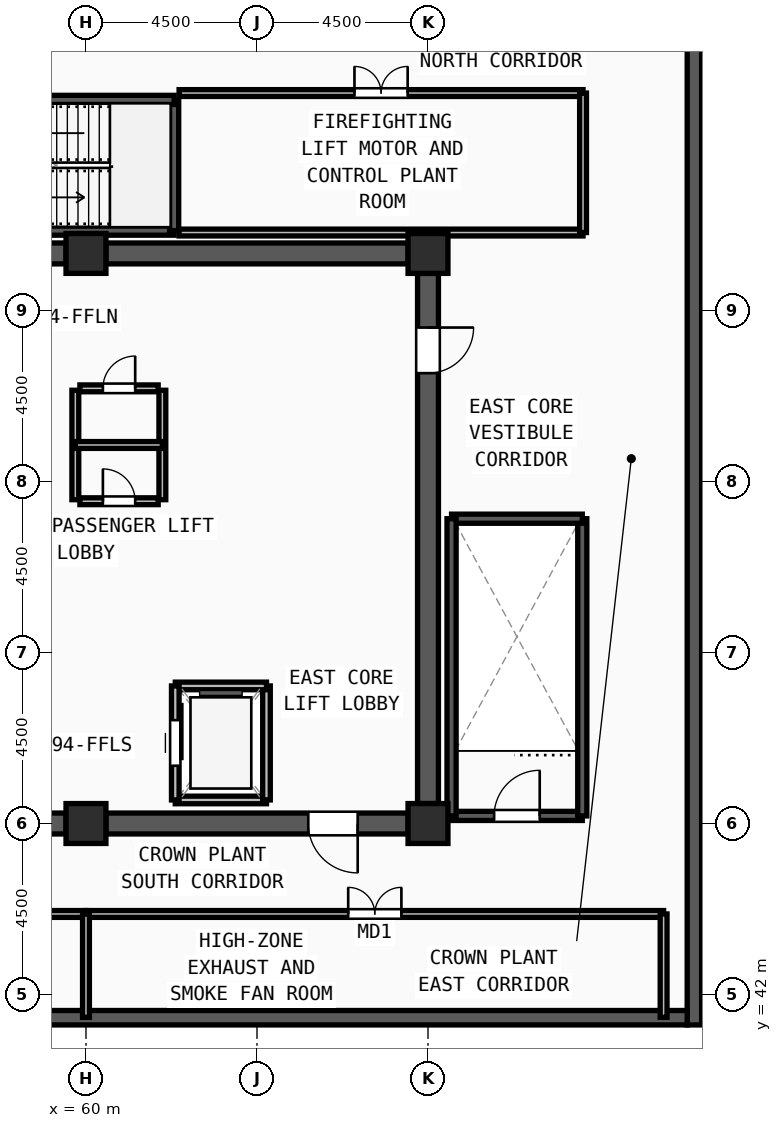
"""IFC4 building model, lengths in metres.
Left out: names, types, materials, properties, quantities, classifications, styles, units other than length and angle.
Written with IfcOpenShell. Run it as: python <this file> out.ifc"""

import sys

from ifc_helpers import new_model, si_unit, direction, frame, frame_2d, origin, origin_2d, place, context, subcontext, project, spatial, rectangle, extrude, source, transform, mapped, element, fill, save


model = new_model("IFC4")
c1 = context("Model", 3, precision=1e-05, world=origin(), true_north=direction((0.0, 1.0)))
c2 = subcontext(c1, "Body", "Model", "MODEL_VIEW")
j1 = project(units=[si_unit("LENGTHUNIT", "METRE"), si_unit("PLANEANGLEUNIT", "RADIAN")], contexts=[c1])
p1 = place(None, origin())
s1 = spatial("IfcSite", under=j1, at=p1, CompositionType="ELEMENT")
p2 = place(p1, origin())
s2 = spatial("IfcBuilding", under=s1, at=p2, CompositionType="ELEMENT")
p3 = place(p2, frame((0.0, 0.0, 366.0)))
s3 = spatial("IfcBuildingStorey", under=s2, at=p3, CompositionType="ELEMENT", Elevation=366.0)
m1 = source(origin(), c2, "Body", "SweptSolid", [
    extrude(rectangle(XDim=1.05, YDim=1.05, at=origin_2d()), origin(), (0.0, 0.0, 1.0), 5.4),
])
for number, where, z_axis, x_axis in (
    (1, (60.0, 46.5, 0.0), (0.0, 0.0, 1.0), (1.0, 0.0, 0.0)),
    (2, (69.0, 46.5, 0.0), (0.0, 0.0, 1.0), (1.0, 0.0, 0.0)),
    (3, (69.0, 61.5, 0.0), (0.0, 0.0, 1.0), (1.0, 0.0, 0.0)),
    (4, (60.0, 61.5, 0.0), (0.0, 0.0, 1.0), (1.0, 0.0, 0.0)),
):
    element("IfcColumn", number, at=place(p3, frame(where, z_axis=z_axis, x_axis=x_axis)), inside=s3, PredefinedType="COLUMN", context=c2, shape_type="MappedRepresentation", body=[
        mapped(m1, transform((0.0, 0.0, 0.0), x_axis=(1.0, 0.0, 0.0), y_axis=(0.0, 1.0, 0.0), z_axis=(0.0, 0.0, 1.0), scale=1.0)),
    ])
p4 = place(p3, frame((76.01, 68.5, 0.0), z_axis=(0.0, 0.0, 1.0), x_axis=(0.0, -1.0, 0.0)))
e5 = element("IfcWall", 5, at=p4, inside=s3, PredefinedType="SOLIDWALL", context=c2, shape_type="SweptSolid", body=[
    extrude(rectangle(XDim=27.3, YDim=0.38, at=frame_2d((13.65, 0.0))), origin(), (0.0, 0.0, 1.0), 4.95),
])
p5 = place(p3, frame((75.82, 41.39, 0.0), z_axis=(0.0, 0.0, 1.0), x_axis=(-1.0, 0.0, 0.0)))
e6 = element("IfcWall", 6, at=p5, inside=s3, PredefinedType="SOLIDWALL", context=c2, shape_type="SweptSolid", body=[
    extrude(rectangle(XDim=31.64, YDim=0.38, at=frame_2d((15.82, 0.0))), origin(), (0.0, 0.0, 1.0), 4.95),
])
for number, where, z_axis, x_axis in (
    (7, (51.525, 61.5, 0.0), (0.0, 0.0, 1.0), (1.0, 0.0, 0.0)),
    (8, (60.525, 61.5, 0.0), (0.0, 0.0, 1.0), (1.0, 0.0, 0.0)),
):
    element("IfcWall", number, at=place(p3, frame(where, z_axis=z_axis, x_axis=x_axis)), inside=s3, PredefinedType="SHEAR", context=c2, shape_type="SweptSolid", body=[
        extrude(rectangle(XDim=7.95, YDim=0.55, at=frame_2d((3.975, 0.0))), origin(), (0.0, 0.0, 1.0), 4.95),
    ])
p6 = place(p3, frame((69.0, 60.975, 0.0), z_axis=(0.0, 0.0, 1.0), x_axis=(0.0, -1.0, 0.0)))
e9 = element("IfcWall", 9, at=p6, inside=s3, PredefinedType="SHEAR", context=c2, shape_type="SweptSolid", body=[
    extrude(rectangle(XDim=13.95, YDim=0.55, at=frame_2d((6.975, 0.0))), origin(), (0.0, 0.0, 1.0), 4.95),
])
m2 = source(origin(), c2, "Body", "SweptSolid", [
    extrude(rectangle(XDim=1.2, YDim=2.2, at=frame_2d((0.6, 1.1))), frame((0.0, 0.285, 0.0), z_axis=(0.0, -1.0, 0.0), x_axis=(1.0, 0.0, 0.0)), (0.0, 0.0, 1.0), 0.57),
])
p7 = place(p6, frame((1.425, 0.0, 0.0)))
e10 = element("IfcOpeningElement", 10, at=p7, cuts=e9, PredefinedType="OPENING", context=c2, shape_type="MappedRepresentation", body=[
    mapped(m2, transform((0.0, 0.0, 0.0), x_axis=(1.0, 0.0, 0.0), y_axis=(0.0, 1.0, 0.0), z_axis=(0.0, 0.0, 1.0), scale=1.0)),
])
p8 = place(p3, frame((68.475, 46.5, 0.0), z_axis=(0.0, 0.0, 1.0), x_axis=(-1.0, 0.0, 0.0)))
e11 = element("IfcWall", 11, at=p8, inside=s3, PredefinedType="SHEAR", context=c2, shape_type="SweptSolid", body=[
    extrude(rectangle(XDim=7.95, YDim=0.55, at=frame_2d((3.975, 0.0))), origin(), (0.0, 0.0, 1.0), 4.95),
])
m3 = source(origin(), c2, "Body", "SweptSolid", [
    extrude(rectangle(XDim=1.3, YDim=2.2, at=frame_2d((0.65, 1.1))), frame((0.0, 0.285, 0.0), z_axis=(0.0, -1.0, 0.0), x_axis=(1.0, 0.0, 0.0)), (0.0, 0.0, 1.0), 0.57),
])
p9 = place(p8, frame((1.325, 0.0, 0.0)))
e12 = element("IfcOpeningElement", 12, at=p9, cuts=e11, PredefinedType="OPENING", context=c2, shape_type="MappedRepresentation", body=[
    mapped(m3, transform((0.0, 0.0, 0.0), x_axis=(1.0, 0.0, 0.0), y_axis=(0.0, 1.0, 0.0), z_axis=(0.0, 0.0, 1.0), scale=1.0)),
])
p10 = place(p3, frame((59.475, 46.5, 0.0), z_axis=(0.0, 0.0, 1.0), x_axis=(-1.0, 0.0, 0.0)))
e13 = element("IfcWall", 13, at=p10, inside=s3, PredefinedType="SHEAR", context=c2, shape_type="SweptSolid", body=[
    extrude(rectangle(XDim=7.95, YDim=0.55, at=frame_2d((3.975, 0.0))), origin(), (0.0, 0.0, 1.0), 4.95),
])
p11 = place(p10, frame((5.325, 0.0, 0.0)))
e14 = element("IfcOpeningElement", 14, at=p11, cuts=e13, PredefinedType="OPENING", context=c2, shape_type="MappedRepresentation", body=[
    mapped(m3, transform((0.0, 0.0, 0.0), x_axis=(1.0, 0.0, 0.0), y_axis=(0.0, 1.0, 0.0), z_axis=(0.0, 0.0, 1.0), scale=1.0)),
])
m4 = source(origin(), c2, "Body", "SweptSolid", [
    extrude(rectangle(XDim=1.0, YDim=2.2, at=frame_2d((0.5, 1.1))), frame((0.0, 0.285, 0.0), z_axis=(0.0, -1.0, 0.0), x_axis=(1.0, 0.0, 0.0)), (0.0, 0.0, 1.0), 0.57),
])
p12 = place(p10, frame((0.825, 0.0, 0.0)))
e15 = element("IfcOpeningElement", 15, at=p12, cuts=e13, PredefinedType="OPENING", context=c2, shape_type="MappedRepresentation", body=[
    mapped(m4, transform((0.0, 0.0, 0.0), x_axis=(1.0, 0.0, 0.0), y_axis=(0.0, 1.0, 0.0), z_axis=(0.0, 0.0, 1.0), scale=1.0)),
])
p13 = place(p3, frame((69.62, 46.7, 0.0), z_axis=(0.0, 0.0, 1.0), x_axis=(1.0, 0.0, 0.0)))
e16 = element("IfcWall", 16, at=p13, inside=s3, PredefinedType="SOLIDWALL", context=c2, shape_type="SweptSolid", body=[
    extrude(rectangle(XDim=3.44, YDim=0.24, at=frame_2d((1.72, 0.0))), origin(), (0.0, 0.0, 1.0), 4.95),
])
m5 = source(origin(), c2, "Body", "SweptSolid", [
    extrude(rectangle(XDim=1.2, YDim=2.2, at=frame_2d((0.6, 1.1))), frame((0.0, 0.13, 0.0), z_axis=(0.0, -1.0, 0.0), x_axis=(1.0, 0.0, 0.0)), (0.0, 0.0, 1.0), 0.26),
])
p14 = place(p13, frame((1.12, 0.0, 0.0)))
e17 = element("IfcOpeningElement", 17, at=p14, cuts=e16, PredefinedType="OPENING", context=c2, shape_type="MappedRepresentation", body=[
    mapped(m5, transform((0.0, 0.0, 0.0), x_axis=(1.0, 0.0, 0.0), y_axis=(0.0, 1.0, 0.0), z_axis=(0.0, 0.0, 1.0), scale=1.0)),
])
p15 = place(p3, frame((73.06, 46.7, 0.0), z_axis=(0.0, 0.0, 1.0), x_axis=(0.0, 1.0, 0.0)))
e18 = element("IfcWall", 18, at=p15, inside=s3, PredefinedType="SOLIDWALL", context=c2, shape_type="SweptSolid", body=[
    extrude(rectangle(XDim=7.82, YDim=0.24, at=frame_2d((3.91, 0.0))), origin(), (0.0, 0.0, 1.0), 4.95),
])
p16 = place(p3, frame((73.06, 54.52, 0.0), z_axis=(0.0, 0.0, 1.0), x_axis=(-1.0, 0.0, 0.0)))
e19 = element("IfcWall", 19, at=p16, inside=s3, PredefinedType="SOLIDWALL", context=c2, shape_type="SweptSolid", body=[
    extrude(rectangle(XDim=3.44, YDim=0.24, at=frame_2d((1.72, 0.0))), origin(), (0.0, 0.0, 1.0), 4.95),
])
for number, where, z_axis, x_axis in (
    (20, (69.62, 54.52, 0.0), (0.0, 0.0, 1.0), (0.0, -1.0, 0.0)),
    (21, (54.5, 62.1, 0.0), (0.0, 0.0, 1.0), (1.0, 0.0, 0.0)),
):
    element("IfcWall", number, at=place(p3, frame(where, z_axis=z_axis, x_axis=x_axis)), inside=s3, PredefinedType="SOLIDWALL", context=c2, shape_type="SweptSolid", body=[
        extrude(rectangle(XDim=7.82, YDim=0.24, at=frame_2d((3.91, 0.0))), origin(), (0.0, 0.0, 1.0), 4.95),
    ])
p17 = place(p3, frame((62.32, 62.1, 0.0), z_axis=(0.0, 0.0, 1.0), x_axis=(0.0, 1.0, 0.0)))
e22 = element("IfcWall", 22, at=p17, inside=s3, PredefinedType="SOLIDWALL", context=c2, shape_type="SweptSolid", body=[
    extrude(rectangle(XDim=3.44, YDim=0.24, at=frame_2d((1.72, 0.0))), origin(), (0.0, 0.0, 1.0), 4.95),
])
p18 = place(p3, frame((62.32, 65.54, 0.0), z_axis=(0.0, 0.0, 1.0), x_axis=(-1.0, 0.0, 0.0)))
e23 = element("IfcWall", 23, at=p18, inside=s3, PredefinedType="SOLIDWALL", context=c2, shape_type="SweptSolid", body=[
    extrude(rectangle(XDim=7.82, YDim=0.24, at=frame_2d((3.91, 0.0))), origin(), (0.0, 0.0, 1.0), 4.95),
])
p19 = place(p18, frame((6.3, 0.0, 0.0)))
e24 = element("IfcOpeningElement", 24, at=p19, cuts=e23, PredefinedType="OPENING", context=c2, shape_type="MappedRepresentation", body=[
    mapped(m5, transform((0.0, 0.0, 0.0), x_axis=(1.0, 0.0, 0.0), y_axis=(0.0, 1.0, 0.0), z_axis=(0.0, 0.0, 1.0), scale=1.0)),
])
p20 = place(p3, frame((62.35, 47.12, 0.0), z_axis=(0.0, 0.0, 1.0), x_axis=(1.0, 0.0, 0.0)))
e25 = element("IfcWall", 25, at=p20, inside=s3, PredefinedType="SOLIDWALL", context=c2, shape_type="SweptSolid", body=[
    extrude(rectangle(XDim=2.4, YDim=0.2, at=frame_2d((1.2, 0.0))), origin(), (0.0, 0.0, 1.0), 4.95),
])
p21 = place(p3, frame((64.75, 47.12, 0.0), z_axis=(0.0, 0.0, 1.0), x_axis=(0.0, 1.0, 0.0)))
e26 = element("IfcWall", 26, at=p21, inside=s3, PredefinedType="SOLIDWALL", context=c2, shape_type="SweptSolid", body=[
    extrude(rectangle(XDim=3.0, YDim=0.2, at=frame_2d((1.5, 0.0))), origin(), (0.0, 0.0, 1.0), 4.95),
])
p22 = place(p3, frame((64.75, 50.12, 0.0), z_axis=(0.0, 0.0, 1.0), x_axis=(-1.0, 0.0, 0.0)))
e27 = element("IfcWall", 27, at=p22, inside=s3, PredefinedType="SOLIDWALL", context=c2, shape_type="SweptSolid", body=[
    extrude(rectangle(XDim=2.4, YDim=0.2, at=frame_2d((1.2, 0.0))), origin(), (0.0, 0.0, 1.0), 4.95),
])
p23 = place(p3, frame((62.35, 50.12, 0.0), z_axis=(0.0, 0.0, 1.0), x_axis=(0.0, -1.0, 0.0)))
e28 = element("IfcWall", 28, at=p23, inside=s3, PredefinedType="SOLIDWALL", context=c2, shape_type="SweptSolid", body=[
    extrude(rectangle(XDim=3.0, YDim=0.2, at=frame_2d((1.5, 0.0))), origin(), (0.0, 0.0, 1.0), 4.95),
])
m6 = source(origin(), c2, "Body", "SweptSolid", [
    extrude(rectangle(XDim=1.2, YDim=2.3, at=frame_2d((0.6, 1.15))), frame((0.0, 0.11, 0.0), z_axis=(0.0, -1.0, 0.0), x_axis=(1.0, 0.0, 0.0)), (0.0, 0.0, 1.0), 0.22),
])
p24 = place(p23, frame((0.9, 0.0, 0.0)))
e29 = element("IfcOpeningElement", 29, at=p24, cuts=e28, PredefinedType="OPENING", context=c2, shape_type="MappedRepresentation", body=[
    mapped(m6, transform((0.0, 0.0, 0.0), x_axis=(1.0, 0.0, 0.0), y_axis=(0.0, 1.0, 0.0), z_axis=(0.0, 0.0, 1.0), scale=1.0)),
])
p25 = place(p3, frame((59.84, 54.98, 0.0), z_axis=(0.0, 0.0, 1.0), x_axis=(1.0, 0.0, 0.0)))
e30 = element("IfcWall", 30, at=p25, inside=s3, PredefinedType="PARTITIONING", context=c2, shape_type="SweptSolid", body=[
    extrude(rectangle(XDim=2.06, YDim=0.18, at=frame_2d((1.03, 0.0))), origin(), (0.0, 0.0, 1.0), 4.95),
])
m7 = source(origin(), c2, "Body", "SweptSolid", [
    extrude(rectangle(XDim=0.85, YDim=2.1, at=frame_2d((0.425, 1.05))), frame((0.0, 0.1, 0.0), z_axis=(0.0, -1.0, 0.0), x_axis=(1.0, 0.0, 0.0)), (0.0, 0.0, 1.0), 0.2),
])
p26 = place(p25, frame((0.605, 0.0, 0.0)))
e31 = element("IfcOpeningElement", 31, at=p26, cuts=e30, PredefinedType="OPENING", context=c2, shape_type="MappedRepresentation", body=[
    mapped(m7, transform((0.0, 0.0, 0.0), x_axis=(1.0, 0.0, 0.0), y_axis=(0.0, 1.0, 0.0), z_axis=(0.0, 0.0, 1.0), scale=1.0)),
])
p27 = place(p3, frame((59.84, 57.95, 0.0), z_axis=(0.0, 0.0, 1.0), x_axis=(1.0, 0.0, 0.0)))
e32 = element("IfcWall", 32, at=p27, inside=s3, PredefinedType="PARTITIONING", context=c2, shape_type="SweptSolid", body=[
    extrude(rectangle(XDim=2.06, YDim=0.18, at=frame_2d((1.03, 0.0))), origin(), (0.0, 0.0, 1.0), 4.95),
])
p28 = place(p27, frame((0.605, 0.0, 0.0)))
e33 = element("IfcOpeningElement", 33, at=p28, cuts=e32, PredefinedType="OPENING", context=c2, shape_type="MappedRepresentation", body=[
    mapped(m7, transform((0.0, 0.0, 0.0), x_axis=(1.0, 0.0, 0.0), y_axis=(0.0, 1.0, 0.0), z_axis=(0.0, 0.0, 1.0), scale=1.0)),
])
p29 = place(p3, frame((44.8, 44.12, 0.0), z_axis=(0.0, 0.0, 1.0), x_axis=(1.0, 0.0, 0.0)))
e34 = element("IfcWall", 34, at=p29, inside=s3, PredefinedType="PARTITIONING", context=c2, shape_type="SweptSolid", body=[
    extrude(rectangle(XDim=15.2, YDim=0.18, at=frame_2d((7.6, 0.0))), origin(), (0.0, 0.0, 1.0), 4.95),
])
m8 = source(origin(), c2, "Body", "SweptSolid", [
    extrude(rectangle(XDim=1.4, YDim=2.25, at=frame_2d((0.7, 1.125))), frame((0.0, 0.1, 0.0), z_axis=(0.0, -1.0, 0.0), x_axis=(1.0, 0.0, 0.0)), (0.0, 0.0, 1.0), 0.2),
])
p30 = place(p29, frame((6.9, 0.0, 0.0)))
e35 = element("IfcOpeningElement", 35, at=p30, cuts=e34, PredefinedType="OPENING", context=c2, shape_type="MappedRepresentation", body=[
    mapped(m8, transform((0.0, 0.0, 0.0), x_axis=(1.0, 0.0, 0.0), y_axis=(0.0, 1.0, 0.0), z_axis=(0.0, 0.0, 1.0), scale=1.0)),
])
p31 = place(p3, frame((60.0, 44.12, 0.0), z_axis=(0.0, 0.0, 1.0), x_axis=(1.0, 0.0, 0.0)))
e36 = element("IfcWall", 36, at=p31, inside=s3, PredefinedType="PARTITIONING", context=c2, shape_type="SweptSolid", body=[
    extrude(rectangle(XDim=15.2, YDim=0.18, at=frame_2d((7.6, 0.0))), origin(), (0.0, 0.0, 1.0), 4.95),
])
p32 = place(p31, frame((6.9, 0.0, 0.0)))
e37 = element("IfcOpeningElement", 37, at=p32, cuts=e36, PredefinedType="OPENING", context=c2, shape_type="MappedRepresentation", body=[
    mapped(m8, transform((0.0, 0.0, 0.0), x_axis=(1.0, 0.0, 0.0), y_axis=(0.0, 1.0, 0.0), z_axis=(0.0, 0.0, 1.0), scale=1.0)),
])
p33 = place(p3, frame((62.45, 65.72, 0.0), z_axis=(0.0, 0.0, 1.0), x_axis=(1.0, 0.0, 0.0)))
e38 = element("IfcWall", 38, at=p33, inside=s3, PredefinedType="PARTITIONING", context=c2, shape_type="SweptSolid", body=[
    extrude(rectangle(XDim=10.63, YDim=0.18, at=frame_2d((5.315, 0.0))), origin(), (0.0, 0.0, 1.0), 4.95),
])
p34 = place(p33, frame((4.615, 0.0, 0.0)))
e39 = element("IfcOpeningElement", 39, at=p34, cuts=e38, PredefinedType="OPENING", context=c2, shape_type="MappedRepresentation", body=[
    mapped(m8, transform((0.0, 0.0, 0.0), x_axis=(1.0, 0.0, 0.0), y_axis=(0.0, 1.0, 0.0), z_axis=(0.0, 0.0, 1.0), scale=1.0)),
])
for number, where, z_axis, x_axis in (
    (40, (59.72, 55.02, 0.0), (0.0, 0.0, 1.0), (0.0, 1.0, 0.0)),
    (41, (62.01, 55.02, 0.0), (0.0, 0.0, 1.0), (0.0, 1.0, 0.0)),
):
    element("IfcWall", number, at=place(p3, frame(where, z_axis=z_axis, x_axis=x_axis)), inside=s3, PredefinedType="PARTITIONING", context=c2, shape_type="SweptSolid", body=[
        extrude(rectangle(XDim=2.88, YDim=0.18, at=frame_2d((1.44, 0.0))), origin(), (0.0, 0.0, 1.0), 4.95),
    ])
p35 = place(p3, frame((59.72, 56.46, 0.0), z_axis=(0.0, 0.0, 1.0), x_axis=(1.0, 0.0, 0.0)))
e42 = element("IfcWall", 42, at=p35, inside=s3, PredefinedType="PARTITIONING", context=c2, shape_type="SweptSolid", body=[
    extrude(rectangle(XDim=2.29, YDim=0.18, at=frame_2d((1.145, 0.0))), origin(), (0.0, 0.0, 1.0), 4.95),
])
p36 = place(p3, frame((60.0, 41.4, 0.0), z_axis=(0.0, 0.0, 1.0), x_axis=(0.0, 1.0, 0.0)))
e43 = element("IfcWall", 43, at=p36, inside=s3, PredefinedType="PARTITIONING", context=c2, shape_type="SweptSolid", body=[
    extrude(rectangle(XDim=2.72, YDim=0.18, at=frame_2d((1.36, 0.0))), origin(), (0.0, 0.0, 1.0), 4.347),
])
p37 = place(p3, frame((62.45, 62.05, 0.0), z_axis=(0.0, 0.0, 1.0), x_axis=(1.0, 0.0, 0.0)))
e44 = element("IfcWall", 44, at=p37, inside=s3, PredefinedType="PARTITIONING", context=c2, shape_type="SweptSolid", body=[
    extrude(rectangle(XDim=10.63, YDim=0.18, at=frame_2d((5.315, 0.0))), origin(), (0.0, 0.0, 1.0), 4.235),
])
p38 = place(p3, frame((75.2, 41.4, 0.0), z_axis=(0.0, 0.0, 1.0), x_axis=(0.0, 1.0, 0.0)))
e45 = element("IfcWall", 45, at=p38, inside=s3, PredefinedType="PARTITIONING", context=c2, shape_type="SweptSolid", body=[
    extrude(rectangle(XDim=2.72, YDim=0.18, at=frame_2d((1.36, 0.0))), origin(), (0.0, 0.0, 1.0), 4.95),
])
p39 = place(p3, frame((73.08, 62.05, 0.0), z_axis=(0.0, 0.0, 1.0), x_axis=(0.0, 1.0, 0.0)))
e46 = element("IfcWall", 46, at=p39, inside=s3, PredefinedType="PARTITIONING", context=c2, shape_type="SweptSolid", body=[
    extrude(rectangle(XDim=3.67, YDim=0.18, at=frame_2d((1.835, 0.0))), origin(), (0.0, 0.0, 1.0), 4.95),
])
m9 = source(origin(), c2, "Body", "SweptSolid", [
    extrude(rectangle(XDim=1.3, YDim=2.2, at=frame_2d((0.65, 1.1))), frame((0.0, 0.025, 0.0), z_axis=(0.0, -1.0, 0.0), x_axis=(1.0, 0.0, 0.0)), (0.0, 0.0, 1.0), 0.05),
])
p40 = place(p9, origin())
e47 = element("IfcDoor", 47, at=p40, inside=s3, OperationType="SINGLE_SWING_LEFT", PredefinedType="DOOR", context=c2, shape_type="MappedRepresentation", body=[
    mapped(m9, transform((0.0, 0.0, 0.0), x_axis=(1.0, 0.0, 0.0), y_axis=(0.0, 1.0, 0.0), z_axis=(0.0, 0.0, 1.0), scale=1.0)),
])
fill(e12, e47)
m10 = source(origin(), c2, "Body", "SweptSolid", [
    extrude(rectangle(XDim=1.2, YDim=2.2, at=frame_2d((0.6, 1.1))), frame((0.0, 0.025, 0.0), z_axis=(0.0, -1.0, 0.0), x_axis=(1.0, 0.0, 0.0)), (0.0, 0.0, 1.0), 0.05),
])
p41 = place(p7, origin())
e48 = element("IfcDoor", 48, at=p41, inside=s3, OperationType="SINGLE_SWING_LEFT", PredefinedType="DOOR", context=c2, shape_type="MappedRepresentation", body=[
    mapped(m10, transform((0.0, 0.0, 0.0), x_axis=(1.0, 0.0, 0.0), y_axis=(0.0, 1.0, 0.0), z_axis=(0.0, 0.0, 1.0), scale=1.0)),
])
fill(e10, e48)
p42 = place(p14, origin())
e49 = element("IfcDoor", 49, at=p42, inside=s3, OperationType="SINGLE_SWING_RIGHT", PredefinedType="DOOR", context=c2, shape_type="MappedRepresentation", body=[
    mapped(m10, transform((0.0, 0.0, 0.0), x_axis=(1.0, 0.0, 0.0), y_axis=(0.0, 1.0, 0.0), z_axis=(0.0, 0.0, 1.0), scale=1.0)),
])
fill(e17, e49)
m11 = source(origin(), c2, "Body", "SweptSolid", [
    extrude(rectangle(XDim=1.2, YDim=2.3, at=frame_2d((0.6, 1.15))), frame((0.0, 0.025, 0.0), z_axis=(0.0, -1.0, 0.0), x_axis=(1.0, 0.0, 0.0)), (0.0, 0.0, 1.0), 0.05),
])
p43 = place(p24, origin())
e50 = element("IfcDoor", 50, at=p43, inside=s3, OperationType="SLIDING_TO_LEFT", PredefinedType="DOOR", context=c2, shape_type="MappedRepresentation", body=[
    mapped(m11, transform((0.0, 0.0, 0.0), x_axis=(1.0, 0.0, 0.0), y_axis=(0.0, 1.0, 0.0), z_axis=(0.0, 0.0, 1.0), scale=1.0)),
])
fill(e29, e50)
m12 = source(origin(), c2, "Body", "SweptSolid", [
    extrude(rectangle(XDim=0.85, YDim=2.1, at=frame_2d((0.425, 1.05))), frame((0.0, 0.025, 0.0), z_axis=(0.0, -1.0, 0.0), x_axis=(1.0, 0.0, 0.0)), (0.0, 0.0, 1.0), 0.05),
])
p44 = place(p26, origin())
e51 = element("IfcDoor", 51, at=p44, inside=s3, OperationType="SINGLE_SWING_LEFT", PredefinedType="DOOR", context=c2, shape_type="MappedRepresentation", body=[
    mapped(m12, transform((0.0, 0.0, 0.0), x_axis=(1.0, 0.0, 0.0), y_axis=(0.0, 1.0, 0.0), z_axis=(0.0, 0.0, 1.0), scale=1.0)),
])
fill(e31, e51)
p45 = place(p28, origin())
e52 = element("IfcDoor", 52, at=p45, inside=s3, OperationType="SINGLE_SWING_RIGHT", PredefinedType="DOOR", context=c2, shape_type="MappedRepresentation", body=[
    mapped(m12, transform((0.0, 0.0, 0.0), x_axis=(1.0, 0.0, 0.0), y_axis=(0.0, 1.0, 0.0), z_axis=(0.0, 0.0, 1.0), scale=1.0)),
])
fill(e33, e52)
m13 = source(origin(), c2, "Body", "SweptSolid", [
    extrude(rectangle(XDim=1.4, YDim=2.25, at=frame_2d((0.7, 1.125))), frame((0.0, 0.025, 0.0), z_axis=(0.0, -1.0, 0.0), x_axis=(1.0, 0.0, 0.0)), (0.0, 0.0, 1.0), 0.05),
])
p46 = place(p32, origin())
e53 = element("IfcDoor", 53, at=p46, inside=s3, OperationType="DOUBLE_DOOR_SINGLE_SWING", PredefinedType="DOOR", context=c2, shape_type="MappedRepresentation", body=[
    mapped(m13, transform((0.0, 0.0, 0.0), x_axis=(1.0, 0.0, 0.0), y_axis=(0.0, 1.0, 0.0), z_axis=(0.0, 0.0, 1.0), scale=1.0)),
])
fill(e37, e53)
p47 = place(p34, origin())
e54 = element("IfcDoor", 54, at=p47, inside=s3, OperationType="DOUBLE_DOOR_SINGLE_SWING", PredefinedType="DOOR", context=c2, shape_type="MappedRepresentation", body=[
    mapped(m13, transform((0.0, 0.0, 0.0), x_axis=(1.0, 0.0, 0.0), y_axis=(0.0, 1.0, 0.0), z_axis=(0.0, 0.0, 1.0), scale=1.0)),
])
fill(e39, e54)
save(model, sys.argv[1])
